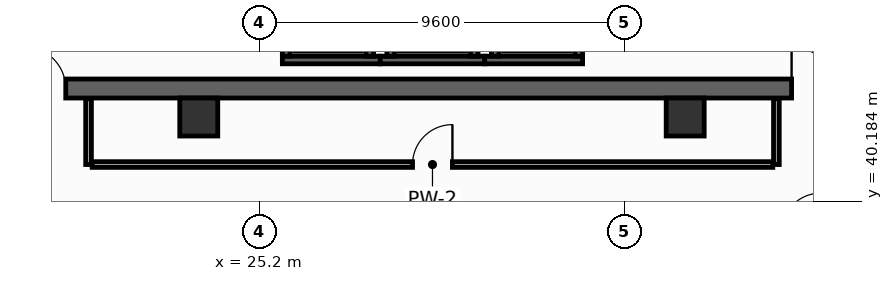
"""IFC4 building model, lengths in metres.
Left out: names, types, materials, properties, quantities, classifications, styles, units other than length and angle.
Written with IfcOpenShell. Run it as: python <this file> out.ifc"""

import sys

from ifc_helpers import new_model, si_unit, direction, frame, frame_2d, origin, origin_2d, place, context, subcontext, project, spatial, rectangle, hollow_rectangle, extrude, element, fill, save


model = new_model("IFC4")
c1 = context("Model", 3, precision=1e-05, world=origin(), true_north=direction((0.0, 1.0)))
c2 = subcontext(c1, "Body", "Model", "MODEL_VIEW")
j1 = project(units=[si_unit("LENGTHUNIT", "METRE"), si_unit("PLANEANGLEUNIT", "RADIAN")], contexts=[c1])
p1 = place(None, origin())
s1 = spatial("IfcSite", under=j1, at=p1, CompositionType="ELEMENT")
p2 = place(p1, origin())
s2 = spatial("IfcBuilding", under=s1, at=p2, CompositionType="ELEMENT")
p3 = place(p2, frame((0.0, 0.0, 152.4)))
s3 = spatial("IfcBuildingStorey", under=s2, at=p3, CompositionType="ELEMENT", Elevation=152.4)
p4 = place(p3, frame((13.6, 43.15, 0.0), z_axis=(0.0, 0.0, 1.0), x_axis=(1.0, 0.0, 0.0)))
e1 = element("IfcWall", 1, at=p4, inside=s3, PredefinedType="SHEAR", context=c2, shape_type="SweptSolid", body=[
    extrude(rectangle(XDim=32.7, YDim=0.5, at=frame_2d((16.35, 0.0))), origin(), (0.0, 0.0, 1.0), 3.55),
])
p5 = place(p4, frame((5.4, 0.0, 0.0)))
e2 = element("IfcOpeningElement", 2, at=p5, cuts=e1, PredefinedType="OPENING", context=c2, shape_type="SweptSolid", body=[
    extrude(rectangle(XDim=1.1, YDim=2.15, at=frame_2d((0.55, 1.075))), frame((0.0, 0.26, 0.0), z_axis=(0.0, -1.0, 0.0), x_axis=(1.0, 0.0, 0.0)), (0.0, 0.0, 1.0), 0.52),
])
p6 = place(p4, frame((25.6, 0.0, 0.0)))
e3 = element("IfcOpeningElement", 3, at=p6, cuts=e1, PredefinedType="OPENING", context=c2, shape_type="SweptSolid", body=[
    extrude(rectangle(XDim=1.1, YDim=2.15, at=frame_2d((0.55, 1.075))), frame((0.0, 0.26, 0.0), z_axis=(0.0, -1.0, 0.0), x_axis=(1.0, 0.0, 0.0)), (0.0, 0.0, 1.0), 0.52),
])
for number, where, z_axis, x_axis in (
    (4, (23.6, 42.4, 0.0), (0.0, 0.0, 1.0), (1.0, 0.0, 0.0)),
    (5, (36.4, 42.4, 0.0), (0.0, 0.0, 1.0), (1.0, 0.0, 0.0)),
):
    element("IfcColumn", number, at=place(p3, frame(where, z_axis=z_axis, x_axis=x_axis)), inside=s3, PredefinedType="COLUMN", context=c2, shape_type="SweptSolid", body=[
        extrude(hollow_rectangle(XDim=1.0, YDim=1.0, WallThickness=0.045, at=origin_2d()), origin(), (0.0, 0.0, 1.0), 3.8),
    ])
p7 = place(p3, frame((25.8, 43.9, 0.0), z_axis=(0.0, 0.0, 1.0), x_axis=(1.0, 0.0, 0.0)))
e6 = element("IfcWall", 6, at=p7, inside=s3, PredefinedType="SHEAR", context=c2, shape_type="SweptSolid", body=[
    extrude(rectangle(XDim=2.575, YDim=0.2, at=frame_2d((1.288, 0.0))), origin(), (0.0, 0.0, 1.0), 3.55),
])
for number, where, z_axis, x_axis in (
    (7, (25.9, 44.0, 0.0), (0.0, 0.0, 1.0), (0.0, 1.0, 0.0)),
    (8, (28.1, 44.0, 0.0), (0.0, 0.0, 1.0), (0.0, 1.0, 0.0)),
):
    element("IfcWall", number, at=place(p3, frame(where, z_axis=z_axis, x_axis=x_axis)), inside=s3, PredefinedType="SHEAR", context=c2, shape_type="SweptSolid", body=[
        extrude(rectangle(XDim=2.3, YDim=0.2, at=frame_2d((1.15, 0.0))), origin(), (0.0, 0.0, 1.0), 3.55),
    ])
p8 = place(p3, frame((28.375, 43.9, 0.0), z_axis=(0.0, 0.0, 1.0), x_axis=(1.0, 0.0, 0.0)))
e9 = element("IfcWall", 9, at=p8, inside=s3, PredefinedType="SHEAR", context=c2, shape_type="SweptSolid", body=[
    extrude(rectangle(XDim=2.75, YDim=0.2, at=frame_2d((1.375, 0.0))), origin(), (0.0, 0.0, 1.0), 3.55),
])
for number, where, z_axis, x_axis in (
    (10, (28.65, 44.0, 0.0), (0.0, 0.0, 1.0), (0.0, 1.0, 0.0)),
    (11, (30.85, 44.0, 0.0), (0.0, 0.0, 1.0), (0.0, 1.0, 0.0)),
):
    element("IfcWall", number, at=place(p3, frame(where, z_axis=z_axis, x_axis=x_axis)), inside=s3, PredefinedType="SHEAR", context=c2, shape_type="SweptSolid", body=[
        extrude(rectangle(XDim=2.3, YDim=0.2, at=frame_2d((1.15, 0.0))), origin(), (0.0, 0.0, 1.0), 3.55),
    ])
p9 = place(p3, frame((31.125, 43.9, 0.0), z_axis=(0.0, 0.0, 1.0), x_axis=(1.0, 0.0, 0.0)))
e12 = element("IfcWall", 12, at=p9, inside=s3, PredefinedType="SHEAR", context=c2, shape_type="SweptSolid", body=[
    extrude(rectangle(XDim=2.575, YDim=0.2, at=frame_2d((1.288, 0.0))), origin(), (0.0, 0.0, 1.0), 3.55),
])
for number, where, z_axis, x_axis in (
    (13, (31.4, 44.0, 0.0), (0.0, 0.0, 1.0), (0.0, 1.0, 0.0)),
    (14, (33.6, 44.0, 0.0), (0.0, 0.0, 1.0), (0.0, 1.0, 0.0)),
):
    element("IfcWall", number, at=place(p3, frame(where, z_axis=z_axis, x_axis=x_axis)), inside=s3, PredefinedType="SHEAR", context=c2, shape_type="SweptSolid", body=[
        extrude(rectangle(XDim=2.3, YDim=0.2, at=frame_2d((1.15, 0.0))), origin(), (0.0, 0.0, 1.0), 3.55),
    ])
for number, where, z_axis, x_axis in (
    (15, (20.7, 41.15, 0.0), (0.0, 0.0, 1.0), (0.0, 1.0, 0.0)),
    (16, (38.8, 41.15, 0.0), (0.0, 0.0, 1.0), (0.0, 1.0, 0.0)),
):
    element("IfcWall", number, at=place(p3, frame(where, z_axis=z_axis, x_axis=x_axis)), inside=s3, PredefinedType="PARTITIONING", context=c2, shape_type="SweptSolid", body=[
        extrude(rectangle(XDim=1.73, YDim=0.15, at=frame_2d((0.865, 0.0))), origin(), (0.0, 0.0, 1.0), 3.55),
    ])
p10 = place(p3, frame((20.795, 41.15, 0.0), z_axis=(0.0, 0.0, 1.0), x_axis=(1.0, 0.0, 0.0)))
e17 = element("IfcWall", 17, at=p10, inside=s3, PredefinedType="PARTITIONING", context=c2, shape_type="SweptSolid", body=[
    extrude(rectangle(XDim=17.91, YDim=0.15, at=frame_2d((8.955, 0.0))), origin(), (0.0, 0.0, 1.0), 2.835),
])
p11 = place(p10, frame((8.43, 0.0, 0.0)))
e18 = element("IfcOpeningElement", 18, at=p11, cuts=e17, PredefinedType="OPENING", context=c2, shape_type="SweptSolid", body=[
    extrude(rectangle(XDim=1.05, YDim=2.15, at=frame_2d((0.525, 1.075))), frame((0.0, 0.085, 0.0), z_axis=(0.0, -1.0, 0.0), x_axis=(1.0, 0.0, 0.0)), (0.0, 0.0, 1.0), 0.17),
])
p12 = place(p5, origin())
e19 = element("IfcDoor", 19, at=p12, inside=s3, OperationType="SINGLE_SWING_LEFT", PredefinedType="DOOR", context=c2, shape_type="SweptSolid", body=[
    extrude(rectangle(XDim=1.1, YDim=2.15, at=frame_2d((0.55, 1.075))), frame((0.0, 0.025, 0.0), z_axis=(0.0, -1.0, 0.0), x_axis=(1.0, 0.0, 0.0)), (0.0, 0.0, 1.0), 0.05),
])
fill(e2, e19)
p13 = place(p6, origin())
e20 = element("IfcDoor", 20, at=p13, inside=s3, OperationType="SINGLE_SWING_LEFT", PredefinedType="DOOR", context=c2, shape_type="SweptSolid", body=[
    extrude(rectangle(XDim=1.1, YDim=2.15, at=frame_2d((0.55, 1.075))), frame((0.0, 0.025, 0.0), z_axis=(0.0, -1.0, 0.0), x_axis=(1.0, 0.0, 0.0)), (0.0, 0.0, 1.0), 0.05),
])
fill(e3, e20)
p14 = place(p11, origin())
e21 = element("IfcDoor", 21, at=p14, inside=s3, OperationType="SINGLE_SWING_RIGHT", PredefinedType="DOOR", context=c2, shape_type="SweptSolid", body=[
    extrude(rectangle(XDim=1.05, YDim=2.15, at=frame_2d((0.525, 1.075))), frame((0.0, 0.025, 0.0), z_axis=(0.0, -1.0, 0.0), x_axis=(1.0, 0.0, 0.0)), (0.0, 0.0, 1.0), 0.05),
])
fill(e18, e21)
save(model, sys.argv[1])
